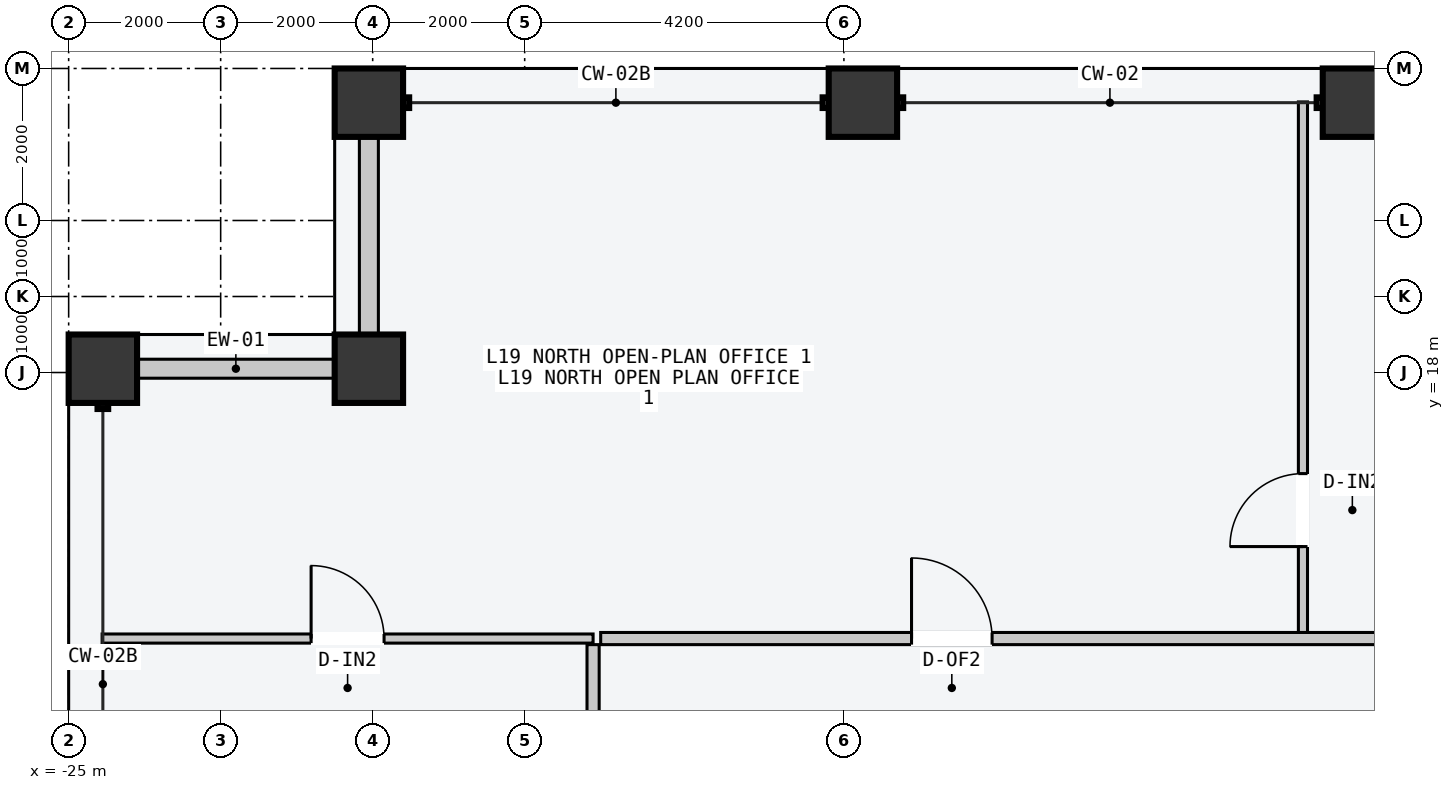
"""IFC4 building model, lengths in metres.
Left out: names, types, materials, properties, quantities, classifications, styles, units other than length and angle.
Written with IfcOpenShell. Run it as: python <this file> out.ifc"""

import sys

from ifc_helpers import new_model, si_unit, direction, frame, frame_2d, origin, origin_2d, place, context, subcontext, project, spatial, rectangle, hollow_rectangle, extrude, element, fill, save


model = new_model("IFC4")
c1 = context("Model", 3, precision=1e-05, world=origin(), true_north=direction((0.0, 1.0)))
c2 = subcontext(c1, "Body", "Model", "MODEL_VIEW")
j1 = project(units=[si_unit("LENGTHUNIT", "METRE"), si_unit("PLANEANGLEUNIT", "RADIAN")], contexts=[c1])
p1 = place(None, origin())
s1 = spatial("IfcSite", under=j1, at=p1, CompositionType="ELEMENT")
p2 = place(p1, origin())
s2 = spatial("IfcBuilding", under=s1, at=p2, CompositionType="ELEMENT")
p3 = place(p2, frame((0.0, 0.0, 74.4)))
s3 = spatial("IfcBuildingStorey", under=s2, at=p3, CompositionType="ELEMENT", Elevation=74.4)
for number, where, z_axis, x_axis in (
    (1, (-21.05, 21.55, 0.0), (0.0, 0.0, 1.0), (1.0, 0.0, 0.0)),
    (2, (-14.55, 21.55, 0.0), (0.0, 0.0, 1.0), (1.0, 0.0, 0.0)),
    (3, (-8.05, 21.55, 0.0), (0.0, 0.0, 1.0), (1.0, 0.0, 0.0)),
    (4, (-24.55, 18.05, 0.0), (0.0, 0.0, 1.0), (0.0, 1.0, 0.0)),
    (5, (-21.05, 18.05, 0.0), (0.0, 0.0, 1.0), (1.0, 0.0, 0.0)),
):
    element("IfcColumn", number, at=place(p3, frame(where, z_axis=z_axis, x_axis=x_axis)), inside=s3, PredefinedType="COLUMN", context=c2, shape_type="SweptSolid", body=[
        extrude(hollow_rectangle(XDim=0.9, YDim=0.9, WallThickness=0.045, at=origin_2d()), origin(), (0.0, 0.0, 1.0), 3.6),
    ])
for number, where, z_axis, x_axis in (
    (6, (-24.09, 18.05, 0.0), (0.0, 0.0, 1.0), (1.0, 0.0, 0.0)),
    (7, (-21.05, 18.51, 0.0), (0.0, 0.0, 1.0), (0.0, 1.0, 0.0)),
):
    element("IfcWall", number, at=place(p3, frame(where, z_axis=z_axis, x_axis=x_axis)), inside=s3, PredefinedType="STANDARD", context=c2, shape_type="SweptSolid", body=[
        extrude(rectangle(XDim=2.58, YDim=0.25, at=frame_2d((1.29, 0.0))), origin(), (0.0, 0.0, 1.0), 2.7),
    ])
p4 = place(p3, frame((-8.76, 14.56, 0.0), z_axis=(0.0, 0.0, 1.0), x_axis=(0.0, 1.0, 0.0)))
e8 = element("IfcWall", 8, at=p4, inside=s3, PredefinedType="PARTITIONING", context=c2, shape_type="SweptSolid", body=[
    extrude(rectangle(XDim=7.0, YDim=0.12, at=frame_2d((3.5, 0.0))), origin(), (0.0, 0.0, 1.0), 3.4),
])
p5 = place(p4, frame((1.15, 0.0, 0.0)))
e9 = element("IfcOpeningElement", 9, at=p5, cuts=e8, PredefinedType="OPENING", context=c2, shape_type="SweptSolid", body=[
    extrude(rectangle(XDim=0.96, YDim=2.18, at=frame_2d((0.48, 1.09))), frame((0.0, 0.07, 0.0), z_axis=(0.0, -1.0, 0.0), x_axis=(1.0, 0.0, 0.0)), (0.0, 0.0, 1.0), 0.14),
])
p6 = place(p3, frame((-18.0, 14.5, 0.0), z_axis=(0.0, 0.0, 1.0), x_axis=(1.0, 0.0, 0.0)))
e10 = element("IfcWall", 10, at=p6, inside=s3, PredefinedType="PARTITIONING", context=c2, shape_type="SweptSolid", body=[
    extrude(rectangle(XDim=36.0, YDim=0.16, at=frame_2d((18.0, 0.0))), origin(), (0.0, 0.0, 1.0), 3.4),
])
p7 = place(p6, frame((4.09, 0.0, 0.0)))
e11 = element("IfcOpeningElement", 11, at=p7, cuts=e10, PredefinedType="OPENING", context=c2, shape_type="SweptSolid", body=[
    extrude(rectangle(XDim=1.06, YDim=2.2, at=frame_2d((0.53, 1.1))), frame((0.0, 0.09, 0.0), z_axis=(0.0, -1.0, 0.0), x_axis=(1.0, 0.0, 0.0)), (0.0, 0.0, 1.0), 0.18),
])
p8 = place(p6, frame((17.579, 0.0, 0.0)))
e12 = element("IfcOpeningElement", 12, at=p8, cuts=e10, PredefinedType="OPENING", context=c2, shape_type="SweptSolid", body=[
    extrude(rectangle(XDim=1.24, YDim=2.24, at=frame_2d((0.62, 1.12))), frame((0.0, 0.09, 0.0), z_axis=(0.0, -1.0, 0.0), x_axis=(1.0, 0.0, 0.0)), (0.0, 0.0, 1.0), 0.18),
])
p9 = place(p6, frame((30.879, 0.0, 0.0)))
e13 = element("IfcOpeningElement", 13, at=p9, cuts=e10, PredefinedType="OPENING", context=c2, shape_type="SweptSolid", body=[
    extrude(rectangle(XDim=1.4, YDim=2.2, at=frame_2d((0.7, 1.1))), frame((0.0, 0.09, 0.0), z_axis=(0.0, -1.0, 0.0), x_axis=(1.0, 0.0, 0.0)), (0.0, 0.0, 1.0), 0.18),
])
p10 = place(p3, frame((-24.56, 14.5, 0.0), z_axis=(0.0, 0.0, 1.0), x_axis=(1.0, 0.0, 0.0)))
e14 = element("IfcWall", 14, at=p10, inside=s3, PredefinedType="PARTITIONING", context=c2, shape_type="SweptSolid", body=[
    extrude(rectangle(XDim=6.46, YDim=0.12, at=frame_2d((3.23, 0.0))), origin(), (0.0, 0.0, 1.0), 3.4),
])
p11 = place(p10, frame((2.75, 0.0, 0.0)))
e15 = element("IfcOpeningElement", 15, at=p11, cuts=e14, PredefinedType="OPENING", context=c2, shape_type="SweptSolid", body=[
    extrude(rectangle(XDim=0.96, YDim=2.18, at=frame_2d((0.48, 1.09))), frame((0.0, 0.07, 0.0), z_axis=(0.0, -1.0, 0.0), x_axis=(1.0, 0.0, 0.0)), (0.0, 0.0, 1.0), 0.14),
])
p12 = place(p3, frame((-18.1, -14.42, 0.0), z_axis=(0.0, 0.0, 1.0), x_axis=(0.0, 1.0, 0.0)))
e16 = element("IfcWall", 16, at=p12, inside=s3, PredefinedType="PARTITIONING", context=c2, shape_type="SweptSolid", body=[
    extrude(rectangle(XDim=28.84, YDim=0.16, at=frame_2d((14.42, 0.0))), origin(), (0.0, 0.0, 1.0), 3.4),
])
p13 = place(p12, frame((5.725, 0.0, 0.0)))
e17 = element("IfcOpeningElement", 17, at=p13, cuts=e16, PredefinedType="OPENING", context=c2, shape_type="SweptSolid", body=[
    extrude(rectangle(XDim=1.24, YDim=2.24, at=frame_2d((0.62, 1.12))), frame((0.0, 0.09, 0.0), z_axis=(0.0, -1.0, 0.0), x_axis=(1.0, 0.0, 0.0)), (0.0, 0.0, 1.0), 0.18),
])
p14 = place(p12, frame((16.46, 0.0, 0.0)))
e18 = element("IfcOpeningElement", 18, at=p14, cuts=e16, PredefinedType="OPENING", context=c2, shape_type="SweptSolid", body=[
    extrude(rectangle(XDim=1.4, YDim=2.2, at=frame_2d((0.7, 1.1))), frame((0.0, 0.09, 0.0), z_axis=(0.0, -1.0, 0.0), x_axis=(1.0, 0.0, 0.0)), (0.0, 0.0, 1.0), 0.18),
])
p15 = place(p12, frame((24.785, 0.0, 0.0)))
e19 = element("IfcOpeningElement", 19, at=p15, cuts=e16, PredefinedType="OPENING", context=c2, shape_type="SweptSolid", body=[
    extrude(rectangle(XDim=0.9, YDim=2.15, at=frame_2d((0.45, 1.075))), frame((0.0, 0.09, 0.0), z_axis=(0.0, -1.0, 0.0), x_axis=(1.0, 0.0, 0.0)), (0.0, 0.0, 1.0), 0.18),
])
p16 = place(p5, origin())
e20 = element("IfcDoor", 20, at=p16, inside=s3, OperationType="SINGLE_SWING_LEFT", PredefinedType="DOOR", context=c2, shape_type="SweptSolid", body=[
    extrude(rectangle(XDim=0.96, YDim=2.18, at=frame_2d((0.48, 1.09))), frame((0.0, 0.025, 0.0), z_axis=(0.0, -1.0, 0.0), x_axis=(1.0, 0.0, 0.0)), (0.0, 0.0, 1.0), 0.05),
])
fill(e9, e20)
p17 = place(p7, origin())
e21 = element("IfcDoor", 21, at=p17, inside=s3, OperationType="SINGLE_SWING_LEFT", PredefinedType="DOOR", context=c2, shape_type="SweptSolid", body=[
    extrude(rectangle(XDim=1.06, YDim=2.2, at=frame_2d((0.53, 1.1))), frame((0.0, 0.025, 0.0), z_axis=(0.0, -1.0, 0.0), x_axis=(1.0, 0.0, 0.0)), (0.0, 0.0, 1.0), 0.05),
])
fill(e11, e21)
p18 = place(p11, origin())
e22 = element("IfcDoor", 22, at=p18, inside=s3, OperationType="SINGLE_SWING_LEFT", PredefinedType="DOOR", context=c2, shape_type="SweptSolid", body=[
    extrude(rectangle(XDim=0.96, YDim=2.18, at=frame_2d((0.48, 1.09))), frame((0.0, 0.025, 0.0), z_axis=(0.0, -1.0, 0.0), x_axis=(1.0, 0.0, 0.0)), (0.0, 0.0, 1.0), 0.05),
])
fill(e15, e22)
save(model, sys.argv[1])
